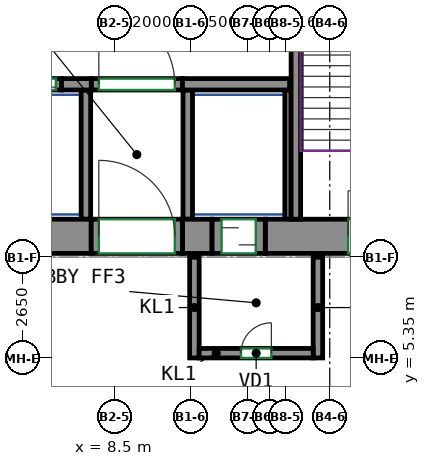
"""IFC4 building model, lengths in metres.
Left out: names, types, materials, properties, quantities, classifications, styles, units other than length and angle.
Written with IfcOpenShell. Run it as: python <this file> out.ifc"""

import sys

from ifc_helpers import new_model, si_unit, direction, frame, frame_2d, origin, place, context, subcontext, project, spatial, rectangle, extrude, source, transform, mapped, element, fill, save


model = new_model("IFC4")
c1 = context("Model", 3, precision=1e-05, world=origin(), true_north=direction((0.0, 1.0)))
c2 = subcontext(c1, "Body", "Model", "MODEL_VIEW")
j1 = project(units=[si_unit("LENGTHUNIT", "METRE"), si_unit("PLANEANGLEUNIT", "RADIAN")], contexts=[c1])
p1 = place(None, origin())
s1 = spatial("IfcSite", under=j1, at=p1, CompositionType="ELEMENT")
p2 = place(p1, origin())
s2 = spatial("IfcBuilding", under=s1, at=p2, CompositionType="ELEMENT")
p3 = place(p2, frame((0.0, 0.0, 164.3)))
s3 = spatial("IfcBuildingStorey", under=s2, at=p3, CompositionType="ELEMENT", Elevation=164.3)
m1 = source(origin(), c2, "Body", "SweptSolid", [
    extrude(rectangle(XDim=14.18, YDim=0.9, at=frame_2d((7.09, 0.0))), origin(), (0.0, 0.0, 1.0), 3.8),
])
p4 = place(p3, frame((-6.29, 8.55, 0.0), z_axis=(0.0, 0.0, 1.0), x_axis=(1.0, 0.0, 0.0)))
e1 = element("IfcWall", 1, at=p4, inside=s3, PredefinedType="SHEAR", context=c2, shape_type="MappedRepresentation", body=[
    mapped(m1, transform((0.0, 0.0, 0.0))),
])
m2 = source(origin(), c2, "Body", "SweptSolid", [
    extrude(rectangle(XDim=0.78, YDim=0.9, at=frame_2d((0.39, 0.0))), origin(), (0.0, 0.0, 1.0), 3.8),
])
p5 = place(p3, frame((10.29, 8.55, 0.0), z_axis=(0.0, 0.0, 1.0), x_axis=(1.0, 0.0, 0.0)))
e2 = element("IfcWall", 2, at=p5, inside=s3, PredefinedType="SHEAR", context=c2, shape_type="MappedRepresentation", body=[
    mapped(m2, transform((0.0, 0.0, 0.0))),
])
m3 = source(origin(), c2, "Body", "SweptSolid", [
    extrude(rectangle(XDim=5.53, YDim=0.9, at=frame_2d((2.765, 0.0))), origin(), (0.0, 0.0, 1.0), 3.8),
])
p6 = place(p3, frame((12.47, 8.55, 0.0), z_axis=(0.0, 0.0, 1.0), x_axis=(1.0, 0.0, 0.0)))
e3 = element("IfcWall", 3, at=p6, inside=s3, PredefinedType="SHEAR", context=c2, shape_type="MappedRepresentation", body=[
    mapped(m3, transform((0.0, 0.0, 0.0))),
])
p7 = place(p6, frame((2.18, 0.0, 0.0)))
e4 = element("IfcOpeningElement", 4, at=p7, cuts=e3, PredefinedType="OPENING", context=c2, shape_type="SweptSolid", body=[
    extrude(rectangle(XDim=1.2, YDim=2.1, at=frame_2d((0.6, 1.05))), frame((0.0, 0.46, 0.0), z_axis=(0.0, -1.0, 0.0), x_axis=(1.0, 0.0, 0.0)), (0.0, 0.0, 1.0), 0.92),
])
m4 = source(origin(), c2, "Body", "SweptSolid", [
    extrude(rectangle(XDim=7.75, YDim=0.25, at=frame_2d((3.875, 0.0))), origin(), (0.0, 0.0, 1.0), 3.8),
])
p8 = place(p3, frame((13.275, 9.0, 0.0), z_axis=(0.0, 0.0, 1.0), x_axis=(0.0, 1.0, 0.0)))
e5 = element("IfcWall", 5, at=p8, inside=s3, PredefinedType="SHEAR", context=c2, shape_type="MappedRepresentation", body=[
    mapped(m4, transform((0.0, 0.0, 0.0))),
])
m5 = source(origin(), c2, "Body", "SweptSolid", [
    extrude(rectangle(XDim=0.78, YDim=0.3, at=frame_2d((0.39, 0.0))), origin(), (0.0, 0.0, 1.0), 3.8),
])
p9 = place(p3, frame((7.11, 12.55, 0.0), z_axis=(0.0, 0.0, 1.0), x_axis=(1.0, 0.0, 0.0)))
e6 = element("IfcWall", 6, at=p9, inside=s3, PredefinedType="SHEAR", context=c2, shape_type="MappedRepresentation", body=[
    mapped(m5, transform((0.0, 0.0, 0.0))),
])
m6 = source(origin(), c2, "Body", "SweptSolid", [
    extrude(rectangle(XDim=2.82, YDim=0.3, at=frame_2d((1.41, 0.0))), origin(), (0.0, 0.0, 1.0), 3.8),
])
p10 = place(p3, frame((10.29, 12.55, 0.0), z_axis=(0.0, 0.0, 1.0), x_axis=(1.0, 0.0, 0.0)))
e7 = element("IfcWall", 7, at=p10, inside=s3, PredefinedType="SHEAR", context=c2, shape_type="MappedRepresentation", body=[
    mapped(m6, transform((0.0, 0.0, 0.0))),
])
m7 = source(origin(), c2, "Body", "SweptSolid", [
    extrude(rectangle(XDim=1.4, YDim=0.3, at=frame_2d((0.7, 0.0))), origin(), (0.0, 0.0, 1.0), 3.8),
])
p11 = place(p3, frame((5.71, 12.55, 0.0), z_axis=(0.0, 0.0, 1.0), x_axis=(1.0, 0.0, 0.0)))
e8 = element("IfcWall", 8, at=p11, inside=s3, PredefinedType="PARTITIONING", context=c2, shape_type="MappedRepresentation", body=[
    mapped(m7, transform((0.0, 0.0, 0.0))),
])
p12 = place(p11, frame((0.15, 0.0, 0.0)))
e9 = element("IfcOpeningElement", 9, at=p12, cuts=e8, PredefinedType="OPENING", context=c2, shape_type="SweptSolid", body=[
    extrude(rectangle(XDim=1.1, YDim=2.1, at=frame_2d((0.55, 1.05))), frame((0.0, 0.16, 0.0), z_axis=(0.0, -1.0, 0.0), x_axis=(1.0, 0.0, 0.0)), (0.0, 0.0, 1.0), 0.32),
])
m8 = source(origin(), c2, "Body", "SweptSolid", [
    extrude(rectangle(XDim=2.4, YDim=0.3, at=frame_2d((1.2, 0.0))), origin(), (0.0, 0.0, 1.0), 3.8),
])
p13 = place(p3, frame((7.89, 12.55, 0.0), z_axis=(0.0, 0.0, 1.0), x_axis=(1.0, 0.0, 0.0)))
e10 = element("IfcWall", 10, at=p13, inside=s3, PredefinedType="PARTITIONING", context=c2, shape_type="MappedRepresentation", body=[
    mapped(m8, transform((0.0, 0.0, 0.0))),
])
p14 = place(p13, frame((0.2, 0.0, 0.0)))
e11 = element("IfcOpeningElement", 11, at=p14, cuts=e10, PredefinedType="OPENING", context=c2, shape_type="SweptSolid", body=[
    extrude(rectangle(XDim=2.0, YDim=2.1, at=frame_2d((1.0, 1.05))), frame((0.0, 0.16, 0.0), z_axis=(0.0, -1.0, 0.0), x_axis=(1.0, 0.0, 0.0)), (0.0, 0.0, 1.0), 0.32),
])
m9 = source(origin(), c2, "Body", "SweptSolid", [
    extrude(rectangle(XDim=2.65, YDim=0.25, at=frame_2d((1.325, 0.0))), origin(), (0.0, 0.0, 1.0), 3.8),
])
p15 = place(p3, frame((10.605, 5.35, 0.0), z_axis=(0.0, 0.0, 1.0), x_axis=(0.0, 1.0, 0.0)))
e12 = element("IfcWall", 12, at=p15, inside=s3, PredefinedType="PARTITIONING", context=c2, shape_type="MappedRepresentation", body=[
    mapped(m9, transform((0.0, 0.0, 0.0))),
])
m10 = source(origin(), c2, "Body", "SweptSolid", [
    extrude(rectangle(XDim=2.65, YDim=0.25, at=frame_2d((1.325, 0.0))), origin(), (0.0, 0.0, 1.0), 2.3),
])
p16 = place(p3, frame((13.855, 5.35, 0.0), z_axis=(0.0, 0.0, 1.0), x_axis=(0.0, 1.0, 0.0)))
e13 = element("IfcWall", 13, at=p16, inside=s3, PredefinedType="PARTITIONING", context=c2, shape_type="MappedRepresentation", body=[
    mapped(m10, transform((0.0, 0.0, 0.0))),
])
m11 = source(origin(), c2, "Body", "SweptSolid", [
    extrude(rectangle(XDim=3.0, YDim=0.25, at=frame_2d((1.5, 0.0))), origin(), (0.0, 0.0, 1.0), 3.8),
])
p17 = place(p3, frame((10.73, 5.475, 0.0), z_axis=(0.0, 0.0, 1.0), x_axis=(1.0, 0.0, 0.0)))
e14 = element("IfcWall", 14, at=p17, inside=s3, PredefinedType="PARTITIONING", context=c2, shape_type="MappedRepresentation", body=[
    mapped(m11, transform((0.0, 0.0, 0.0))),
])
p18 = place(p17, frame((1.1, 0.0, 0.0)))
e15 = element("IfcOpeningElement", 15, at=p18, cuts=e14, PredefinedType="OPENING", context=c2, shape_type="SweptSolid", body=[
    extrude(rectangle(XDim=0.8, YDim=2.0, at=frame_2d((0.4, 1.0))), frame((0.0, 0.135, 0.0), z_axis=(0.0, -1.0, 0.0), x_axis=(1.0, 0.0, 0.0)), (0.0, 0.0, 1.0), 0.27),
])
m12 = source(origin(), c2, "Body", "SweptSolid", [
    extrude(rectangle(XDim=3.4, YDim=0.25, at=frame_2d((1.7, 0.0))), origin(), (0.0, 0.0, 1.0), 3.8),
])
p19 = place(p3, frame((10.43, 9.0, 0.0), z_axis=(0.0, 0.0, 1.0), x_axis=(0.0, 1.0, 0.0)))
e16 = element("IfcWall", 16, at=p19, inside=s3, PredefinedType="PARTITIONING", context=c2, shape_type="MappedRepresentation", body=[
    mapped(m12, transform((0.0, 0.0, 0.0))),
])
m13 = source(origin(), c2, "Body", "SweptSolid", [
    extrude(rectangle(XDim=3.4, YDim=0.165, at=frame_2d((1.7, 0.0))), origin(), (0.0, 0.0, 1.0), 3.8),
])
p20 = place(p3, frame((13.067, 9.0, 0.0), z_axis=(0.0, 0.0, 1.0), x_axis=(0.0, 1.0, 0.0)))
e17 = element("IfcWall", 17, at=p20, inside=s3, PredefinedType="PARTITIONING", context=c2, shape_type="MappedRepresentation", body=[
    mapped(m13, transform((0.0, 0.0, 0.0))),
])
p21 = place(p3, frame((7.75, 9.0, 0.0), z_axis=(0.0, 0.0, 1.0), x_axis=(0.0, 1.0, 0.0)))
e18 = element("IfcWall", 18, at=p21, inside=s3, PredefinedType="PARTITIONING", context=c2, shape_type="MappedRepresentation", body=[
    mapped(m12, transform((0.0, 0.0, 0.0))),
])
m14 = source(origin(), c2, "Body", "SweptSolid", [
    extrude(rectangle(XDim=2.4, YDim=0.9, at=frame_2d((1.2, 0.0))), origin(), (0.0, 0.0, 1.0), 2.7),
])
p22 = place(p3, frame((7.89, 8.55, 0.0), z_axis=(0.0, 0.0, 1.0), x_axis=(1.0, 0.0, 0.0)))
e19 = element("IfcWall", 19, at=p22, inside=s3, PredefinedType="PARTITIONING", context=c2, shape_type="MappedRepresentation", body=[
    mapped(m14, transform((0.0, 0.0, 0.0))),
])
p23 = place(p22, frame((0.2, 0.0, 0.0)))
e20 = element("IfcOpeningElement", 20, at=p23, cuts=e19, PredefinedType="OPENING", context=c2, shape_type="SweptSolid", body=[
    extrude(rectangle(XDim=2.0, YDim=2.1, at=frame_2d((1.0, 1.05))), frame((0.0, 0.46, 0.0), z_axis=(0.0, -1.0, 0.0), x_axis=(1.0, 0.0, 0.0)), (0.0, 0.0, 1.0), 0.92),
])
m15 = source(origin(), c2, "Body", "SweptSolid", [
    extrude(rectangle(XDim=1.4, YDim=0.9, at=frame_2d((0.7, 0.0))), origin(), (0.0, 0.0, 1.0), 2.7),
])
p24 = place(p3, frame((11.07, 8.55, 0.0), z_axis=(0.0, 0.0, 1.0), x_axis=(1.0, 0.0, 0.0)))
e21 = element("IfcWall", 21, at=p24, inside=s3, PredefinedType="PARTITIONING", context=c2, shape_type="MappedRepresentation", body=[
    mapped(m15, transform((0.0, 0.0, 0.0))),
])
p25 = place(p24, frame((0.25, 0.0, 0.0)))
e22 = element("IfcOpeningElement", 22, at=p25, cuts=e21, PredefinedType="OPENING", context=c2, shape_type="SweptSolid", body=[
    extrude(rectangle(XDim=0.9, YDim=2.1, at=frame_2d((0.45, 1.05))), frame((0.0, 0.46, 0.0), z_axis=(0.0, -1.0, 0.0), x_axis=(1.0, 0.0, 0.0)), (0.0, 0.0, 1.0), 0.92),
])
p26 = place(p14, origin())
e23 = element("IfcDoor", 23, at=p26, inside=s3, OperationType="DOUBLE_DOOR_SINGLE_SWING", PredefinedType="DOOR", context=c2, shape_type="SweptSolid", body=[
    extrude(rectangle(XDim=2.0, YDim=2.1, at=frame_2d((1.0, 1.05))), frame((0.0, 0.025, 0.0), z_axis=(0.0, -1.0, 0.0), x_axis=(1.0, 0.0, 0.0)), (0.0, 0.0, 1.0), 0.05),
])
fill(e11, e23)
p27 = place(p23, origin())
e24 = element("IfcDoor", 24, at=p27, inside=s3, OperationType="DOUBLE_DOOR_SINGLE_SWING", PredefinedType="DOOR", context=c2, shape_type="SweptSolid", body=[
    extrude(rectangle(XDim=2.0, YDim=2.1, at=frame_2d((1.0, 1.05))), frame((0.0, 0.355, 0.0), z_axis=(0.0, -1.0, 0.0), x_axis=(1.0, 0.0, 0.0)), (0.0, 0.0, 1.0), 0.05),
])
fill(e20, e24)
p28 = place(p18, origin())
e25 = element("IfcDoor", 25, at=p28, inside=s3, OperationType="SINGLE_SWING_RIGHT", PredefinedType="DOOR", context=c2, shape_type="SweptSolid", body=[
    extrude(rectangle(XDim=0.8, YDim=2.0, at=frame_2d((0.4, 1.0))), frame((0.0, 0.025, 0.0), z_axis=(0.0, -1.0, 0.0), x_axis=(1.0, 0.0, 0.0)), (0.0, 0.0, 1.0), 0.05),
])
fill(e15, e25)
p29 = place(p25, origin())
e26 = element("IfcDoor", 26, at=p29, inside=s3, OperationType="SLIDING_TO_LEFT", PredefinedType="DOOR", context=c2, shape_type="SweptSolid", body=[
    extrude(rectangle(XDim=0.9, YDim=2.1, at=frame_2d((0.45, 1.05))), frame((0.0, 0.355, 0.0), z_axis=(0.0, -1.0, 0.0), x_axis=(1.0, 0.0, 0.0)), (0.0, 0.0, 1.0), 0.05),
])
fill(e22, e26)
p30 = place(p12, origin())
e27 = element("IfcDoor", 27, at=p30, inside=s3, OperationType="DOUBLE_DOOR_SLIDING", PredefinedType="DOOR", context=c2, shape_type="SweptSolid", body=[
    extrude(rectangle(XDim=1.1, YDim=2.1, at=frame_2d((0.55, 1.05))), frame((0.0, 0.025, 0.0), z_axis=(0.0, -1.0, 0.0), x_axis=(1.0, 0.0, 0.0)), (0.0, 0.0, 1.0), 0.05),
])
fill(e9, e27)
p31 = place(p7, origin())
e28 = element("IfcDoor", 28, at=p31, inside=s3, OperationType="DOUBLE_DOOR_SINGLE_SWING", PredefinedType="DOOR", context=c2, shape_type="SweptSolid", body=[
    extrude(rectangle(XDim=1.2, YDim=2.1, at=frame_2d((0.6, 1.05))), frame((0.0, 0.355, 0.0), z_axis=(0.0, -1.0, 0.0), x_axis=(1.0, 0.0, 0.0)), (0.0, 0.0, 1.0), 0.05),
])
fill(e4, e28)
save(model, sys.argv[1])
